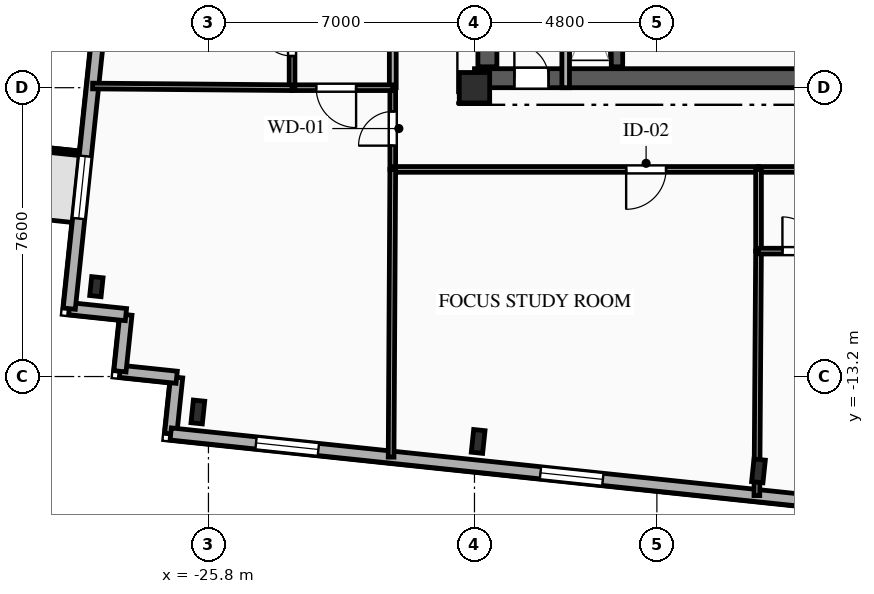
"""IFC4 building model, lengths in metres.
Left out: names, types, materials, properties, quantities, classifications, styles, units other than length and angle.
Written with IfcOpenShell. Run it as: python <this file> out.ifc"""

import sys

from ifc_helpers import new_model, si_unit, direction, frame, frame_2d, origin, origin_2d, place, context, subcontext, project, spatial, rectangle, i_section, extrude, element, fill, save


model = new_model("IFC4")
c1 = context("Model", 3, precision=1e-05, world=origin(), true_north=direction((0.0, 1.0)))
c2 = subcontext(c1, "Body", "Model", "MODEL_VIEW")
j1 = project(units=[si_unit("LENGTHUNIT", "METRE"), si_unit("PLANEANGLEUNIT", "RADIAN")], contexts=[c1])
p1 = place(None, origin())
s1 = spatial("IfcSite", under=j1, at=p1, CompositionType="ELEMENT")
p2 = place(p1, origin())
s2 = spatial("IfcBuilding", under=s1, at=p2, CompositionType="ELEMENT")
p3 = place(p2, frame((0.0, 0.0, 189.7)))
s3 = spatial("IfcBuildingStorey", under=s2, at=p3, CompositionType="ELEMENT", Elevation=189.7)
p4 = place(p3, frame((-18.8, -5.6, 0.0), z_axis=(0.0, 0.0, 1.0), x_axis=(1.0, 0.0, 0.0)))
e1 = element("IfcColumn", 1, at=p4, inside=s3, PredefinedType="COLUMN", context=c2, shape_type="SweptSolid", body=[
    extrude(rectangle(XDim=0.8, YDim=0.8, at=origin_2d()), origin(), (0.0, 0.0, 1.0), 3.35),
])
for number, where, z_axis, x_axis in (
    (2, (-26.079, -14.133, 0.0), (0.0, 0.0, 1.0), (0.995, -0.105, 0.0)),
    (3, (-18.703, -14.908, 0.0), (0.0, 0.0, 1.0), (0.995, -0.105, 0.0)),
    (4, (-11.327, -15.683, 0.0), (0.0, 0.0, 1.0), (0.995, -0.105, 0.0)),
):
    element("IfcColumn", number, at=place(p3, frame(where, z_axis=z_axis, x_axis=x_axis)), inside=s3, PredefinedType="COLUMN", context=c2, shape_type="SweptSolid", body=[
        extrude(i_section(OverallWidth=0.3, OverallDepth=0.6, WebThickness=0.015, FlangeThickness=0.03, FilletRadius=0.027, at=origin_2d()), origin(), (0.0, 0.0, 1.0), 3.35),
    ])
p5 = place(p3, frame((-28.749, -10.835, 0.0), z_axis=(0.0, 0.0, 1.0), x_axis=(0.994521895368, -0.104528463268, 0.0)))
e5 = element("IfcColumn", 5, at=p5, inside=s3, PredefinedType="COLUMN", context=c2, shape_type="SweptSolid", body=[
    extrude(i_section(OverallWidth=0.3, OverallDepth=0.5, WebThickness=0.014, FlangeThickness=0.028, FilletRadius=0.027, at=origin_2d()), origin(), (0.0, 0.0, 1.0), 3.35),
])
for number, where, z_axis, x_axis in (
    (6, (-26.793, -14.711, 0.0), (0.0, 0.0, 1.0), (0.104, 0.995, 0.0)),
    (7, (-26.637, -13.219, 0.0), (0.0, 0.0, 1.0), (-0.995, 0.104, 0.0)),
):
    element("IfcWall", number, at=place(p3, frame(where, z_axis=z_axis, x_axis=x_axis)), inside=s3, PredefinedType="SOLIDWALL", context=c2, shape_type="SweptSolid", body=[
        extrude(rectangle(XDim=1.5, YDim=0.32, at=frame_2d((0.75, 0.0))), origin(), (0.0, 0.0, 1.0), 3.04),
    ])
p6 = place(p3, frame((-28.128, -13.062, 0.0), z_axis=(0.0, 0.0, 1.0), x_axis=(0.104481464157, 0.994526834051, 0.0)))
e8 = element("IfcWall", 8, at=p6, inside=s3, PredefinedType="SOLIDWALL", context=c2, shape_type="SweptSolid", body=[
    extrude(rectangle(XDim=1.5, YDim=0.32, at=frame_2d((0.75, 0.0))), origin(), (0.0, 0.0, 1.0), 3.04),
])
p7 = place(p3, frame((-27.972, -11.571, 0.0), z_axis=(0.0, 0.0, 1.0), x_axis=(-0.994525057048, 0.104498377516, 0.0)))
e9 = element("IfcWall", 9, at=p7, inside=s3, PredefinedType="SOLIDWALL", context=c2, shape_type="SweptSolid", body=[
    extrude(rectangle(XDim=1.5, YDim=0.32, at=frame_2d((0.75, 0.0))), origin(), (0.0, 0.0, 1.0), 3.04),
])
p8 = place(p3, frame((-29.463, -11.414, 0.0), z_axis=(0.0, 0.0, 1.0), x_axis=(0.104530779244, 0.994521651947, 0.0)))
e10 = element("IfcWall", 10, at=p8, inside=s3, PredefinedType="SOLIDWALL", context=c2, shape_type="SweptSolid", body=[
    extrude(rectangle(XDim=28.8, YDim=0.32, at=frame_2d((14.4, 0.0))), origin(), (0.0, 0.0, 1.0), 3.04),
])
p9 = place(p8, frame((2.384, 0.0, 0.85)))
e11 = element("IfcOpeningElement", 11, at=p9, cuts=e10, PredefinedType="OPENING", context=c2, shape_type="SweptSolid", body=[
    extrude(rectangle(XDim=1.65, YDim=1.85, at=frame_2d((0.825, 0.925))), frame((0.0, 0.17, 0.0), z_axis=(0.0, -1.0, 0.0), x_axis=(1.0, 0.0, 0.0)), (0.0, 0.0, 1.0), 0.34),
])
p10 = place(p8, frame((8.973, 0.0, 0.85)))
e12 = element("IfcOpeningElement", 12, at=p10, cuts=e10, PredefinedType="OPENING", context=c2, shape_type="SweptSolid", body=[
    extrude(rectangle(XDim=1.95, YDim=1.85, at=frame_2d((0.975, 0.925))), frame((0.0, 0.17, 0.0), z_axis=(0.0, -1.0, 0.0), x_axis=(1.0, 0.0, 0.0)), (0.0, 0.0, 1.0), 0.34),
])
p11 = place(p8, frame((12.236, 0.0, 0.85)))
e13 = element("IfcOpeningElement", 13, at=p11, cuts=e10, PredefinedType="OPENING", context=c2, shape_type="SweptSolid", body=[
    extrude(rectangle(XDim=1.6, YDim=1.85, at=frame_2d((0.8, 0.925))), frame((0.0, 0.17, 0.0), z_axis=(0.0, -1.0, 0.0), x_axis=(1.0, 0.0, 0.0)), (0.0, 0.0, 1.0), 0.34),
])
p12 = place(p8, frame((15.044, 0.0, 0.85)))
e14 = element("IfcOpeningElement", 14, at=p12, cuts=e10, PredefinedType="OPENING", context=c2, shape_type="SweptSolid", body=[
    extrude(rectangle(XDim=1.6, YDim=1.85, at=frame_2d((0.8, 0.925))), frame((0.0, 0.17, 0.0), z_axis=(0.0, -1.0, 0.0), x_axis=(1.0, 0.0, 0.0)), (0.0, 0.0, 1.0), 0.34),
])
p13 = place(p8, frame((17.892, 0.0, 0.85)))
e15 = element("IfcOpeningElement", 15, at=p13, cuts=e10, PredefinedType="OPENING", context=c2, shape_type="SweptSolid", body=[
    extrude(rectangle(XDim=1.6, YDim=1.85, at=frame_2d((0.8, 0.925))), frame((0.0, 0.17, 0.0), z_axis=(0.0, -1.0, 0.0), x_axis=(1.0, 0.0, 0.0)), (0.0, 0.0, 1.0), 0.34),
])
p14 = place(p8, frame((23.442, 0.0, 0.85)))
e16 = element("IfcOpeningElement", 16, at=p14, cuts=e10, PredefinedType="OPENING", context=c2, shape_type="SweptSolid", body=[
    extrude(rectangle(XDim=1.65, YDim=1.85, at=frame_2d((0.825, 0.925))), frame((0.0, 0.17, 0.0), z_axis=(0.0, -1.0, 0.0), x_axis=(1.0, 0.0, 0.0)), (0.0, 0.0, 1.0), 0.34),
])
p15 = place(p3, frame((18.756, -19.498, 0.0), z_axis=(0.0, 0.0, 1.0), x_axis=(-0.994522060044, 0.104526896475, 0.0)))
e17 = element("IfcWall", 17, at=p15, inside=s3, PredefinedType="SOLIDWALL", context=c2, shape_type="SweptSolid", body=[
    extrude(rectangle(XDim=45.8, YDim=0.32, at=frame_2d((22.9, 0.0))), origin(), (0.0, 0.0, 1.0), 3.04),
])
p16 = place(p15, frame((1.217, 0.0, 0.85)))
e18 = element("IfcOpeningElement", 18, at=p16, cuts=e17, PredefinedType="OPENING", context=c2, shape_type="SweptSolid", body=[
    extrude(rectangle(XDim=1.65, YDim=1.85, at=frame_2d((0.825, 0.925))), frame((0.0, 0.17, 0.0), z_axis=(0.0, -1.0, 0.0), x_axis=(1.0, 0.0, 0.0)), (0.0, 0.0, 1.0), 0.34),
])
p17 = place(p15, frame((5.621, 0.0, 0.85)))
e19 = element("IfcOpeningElement", 19, at=p17, cuts=e17, PredefinedType="OPENING", context=c2, shape_type="SweptSolid", body=[
    extrude(rectangle(XDim=1.65, YDim=1.85, at=frame_2d((0.825, 0.925))), frame((0.0, 0.17, 0.0), z_axis=(0.0, -1.0, 0.0), x_axis=(1.0, 0.0, 0.0)), (0.0, 0.0, 1.0), 0.34),
])
p18 = place(p15, frame((13.433, 0.0, 0.85)))
e20 = element("IfcOpeningElement", 20, at=p18, cuts=e17, PredefinedType="OPENING", context=c2, shape_type="SweptSolid", body=[
    extrude(rectangle(XDim=2.2, YDim=1.85, at=frame_2d((1.1, 0.925))), frame((0.0, 0.17, 0.0), z_axis=(0.0, -1.0, 0.0), x_axis=(1.0, 0.0, 0.0)), (0.0, 0.0, 1.0), 0.34),
])
p19 = place(p15, frame((23.962, 0.0, 0.85)))
e21 = element("IfcOpeningElement", 21, at=p19, cuts=e17, PredefinedType="OPENING", context=c2, shape_type="SweptSolid", body=[
    extrude(rectangle(XDim=2.2, YDim=1.85, at=frame_2d((1.1, 0.925))), frame((0.0, 0.17, 0.0), z_axis=(0.0, -1.0, 0.0), x_axis=(1.0, 0.0, 0.0)), (0.0, 0.0, 1.0), 0.34),
])
p20 = place(p15, frame((34.366, 0.0, 0.85)))
e22 = element("IfcOpeningElement", 22, at=p20, cuts=e17, PredefinedType="OPENING", context=c2, shape_type="SweptSolid", body=[
    extrude(rectangle(XDim=1.65, YDim=1.85, at=frame_2d((0.825, 0.925))), frame((0.0, 0.17, 0.0), z_axis=(0.0, -1.0, 0.0), x_axis=(1.0, 0.0, 0.0)), (0.0, 0.0, 1.0), 0.34),
])
p21 = place(p15, frame((41.892, 0.0, 0.85)))
e23 = element("IfcOpeningElement", 23, at=p21, cuts=e17, PredefinedType="OPENING", context=c2, shape_type="SweptSolid", body=[
    extrude(rectangle(XDim=1.65, YDim=1.85, at=frame_2d((0.825, 0.925))), frame((0.0, 0.17, 0.0), z_axis=(0.0, -1.0, 0.0), x_axis=(1.0, 0.0, 0.0)), (0.0, 0.0, 1.0), 0.34),
])
p22 = place(p3, frame((-18.8, -5.35, 0.0), z_axis=(0.0, 0.0, 1.0), x_axis=(1.0, 0.0, 0.0)))
e24 = element("IfcWall", 24, at=p22, inside=s3, PredefinedType="SHEAR", context=c2, shape_type="SweptSolid", body=[
    extrude(rectangle(XDim=9.6, YDim=0.5, at=frame_2d((4.8, 0.0))), origin(), (0.0, 0.0, 1.0), 3.04),
])
p23 = place(p22, frame((1.05, 0.0, 0.0)))
e25 = element("IfcOpeningElement", 25, at=p23, cuts=e24, PredefinedType="OPENING", context=c2, shape_type="SweptSolid", body=[
    extrude(rectangle(XDim=0.9, YDim=2.1, at=frame_2d((0.45, 1.05))), frame((0.0, 0.26, 0.0), z_axis=(0.0, -1.0, 0.0), x_axis=(1.0, 0.0, 0.0)), (0.0, 0.0, 1.0), 0.52),
])
p24 = place(p3, frame((-18.46, -5.05, 0.0), z_axis=(0.0, 0.0, 1.0), x_axis=(0.0, 1.0, 0.0)))
e26 = element("IfcWall", 26, at=p24, inside=s3, PredefinedType="SHEAR", context=c2, shape_type="SweptSolid", body=[
    extrude(rectangle(XDim=10.1, YDim=0.5, at=frame_2d((5.05, 0.0))), origin(), (0.0, 0.0, 1.0), 3.04),
])
p25 = place(p3, frame((-15.05, -5.05, 0.0), z_axis=(0.0, 0.0, 1.0), x_axis=(0.0, 1.0, 0.0)))
e27 = element("IfcWall", 27, at=p25, inside=s3, PredefinedType="SHEAR", context=c2, shape_type="SweptSolid", body=[
    extrude(rectangle(XDim=10.1, YDim=0.3, at=frame_2d((5.05, 0.0))), origin(), (0.0, 0.0, 1.0), 3.04),
])
p26 = place(p3, frame((-16.4, -5.6, 0.0), z_axis=(0.0, 0.0, 1.0), x_axis=(0.0, 1.0, 0.0)))
e28 = element("IfcWall", 28, at=p26, inside=s3, PredefinedType="PARTITIONING", context=c2, shape_type="SweptSolid", body=[
    extrude(rectangle(XDim=3.49, YDim=0.2, at=frame_2d((1.745, 0.0))), origin(), (0.0, 0.0, 1.0), 3.04),
])
p27 = place(p3, frame((-20.95, -7.75, 0.0), z_axis=(0.0, 0.0, 1.0), x_axis=(0.0, 1.0, 0.0)))
e29 = element("IfcWall", 29, at=p27, inside=s3, PredefinedType="PARTITIONING", context=c2, shape_type="SweptSolid", body=[
    extrude(rectangle(XDim=2.15, YDim=0.15, at=frame_2d((1.075, 0.0))), origin(), (0.0, 0.0, 1.0), 3.04),
])
p28 = place(p27, frame((0.625, 0.0, 0.0)))
e30 = element("IfcOpeningElement", 30, at=p28, cuts=e29, PredefinedType="OPENING", context=c2, shape_type="SweptSolid", body=[
    extrude(rectangle(XDim=0.9, YDim=2.1, at=frame_2d((0.45, 1.05))), frame((0.0, 0.085, 0.0), z_axis=(0.0, -1.0, 0.0), x_axis=(1.0, 0.0, 0.0)), (0.0, 0.0, 1.0), 0.17),
])
p29 = place(p3, frame((-11.325, -7.75, 0.0), z_axis=(0.0, 0.0, 1.0), x_axis=(-1.0, 0.0, 0.0)))
e31 = element("IfcWall", 31, at=p29, inside=s3, PredefinedType="PARTITIONING", context=c2, shape_type="SweptSolid", body=[
    extrude(rectangle(XDim=9.625, YDim=0.15, at=frame_2d((4.812, 0.0))), origin(), (0.0, 0.0, 1.0), 3.04),
])
p30 = place(p29, frame((2.434, 0.0, 0.0)))
e32 = element("IfcOpeningElement", 32, at=p30, cuts=e31, PredefinedType="OPENING", context=c2, shape_type="SweptSolid", body=[
    extrude(rectangle(XDim=1.05, YDim=2.15, at=frame_2d((0.525, 1.075))), frame((0.0, 0.085, 0.0), z_axis=(0.0, -1.0, 0.0), x_axis=(1.0, 0.0, 0.0)), (0.0, 0.0, 1.0), 0.17),
])
p31 = place(p3, frame((-8.875, -7.75, 0.0), z_axis=(0.0, 0.0, 1.0), x_axis=(-1.0, 0.0, 0.0)))
e33 = element("IfcWall", 33, at=p31, inside=s3, PredefinedType="PLUMBINGWALL", context=c2, shape_type="SweptSolid", body=[
    extrude(rectangle(XDim=2.45, YDim=0.15, at=frame_2d((1.225, 0.0))), origin(), (0.0, 0.0, 1.0), 3.04),
])
p32 = place(p3, frame((-20.95, -5.6, 0.0), z_axis=(0.0, 0.0, 1.0), x_axis=(0.0, 1.0, 0.0)))
e34 = element("IfcWall", 34, at=p32, inside=s3, PredefinedType="PARTITIONING", context=c2, shape_type="SweptSolid", body=[
    extrude(rectangle(XDim=14.1, YDim=0.18, at=frame_2d((7.05, 0.0))), origin(), (0.0, 0.0, 1.0), 3.04),
])
p33 = place(p32, frame((5.058, 0.0, 0.0)))
e35 = element("IfcOpeningElement", 35, at=p33, cuts=e34, PredefinedType="OPENING", context=c2, shape_type="SweptSolid", body=[
    extrude(rectangle(XDim=1.0, YDim=2.15, at=frame_2d((0.5, 1.075))), frame((0.0, 0.1, 0.0), z_axis=(0.0, -1.0, 0.0), x_axis=(1.0, 0.0, 0.0)), (0.0, 0.0, 1.0), 0.2),
])
p34 = place(p3, frame((-20.95, -5.6, 0.0), z_axis=(0.0, 0.0, 1.0), x_axis=(-1.0, 0.0, 0.0)))
e36 = element("IfcWall", 36, at=p34, inside=s3, PredefinedType="PARTITIONING", context=c2, shape_type="SweptSolid", body=[
    extrude(rectangle(XDim=2.65, YDim=0.15, at=frame_2d((1.325, 0.0))), origin(), (0.0, 0.0, 1.0), 3.04),
])
p35 = place(p34, frame((0.965, 0.0, 0.0)))
e37 = element("IfcOpeningElement", 37, at=p35, cuts=e36, PredefinedType="OPENING", context=c2, shape_type="SweptSolid", body=[
    extrude(rectangle(XDim=1.05, YDim=2.15, at=frame_2d((0.525, 1.075))), frame((0.0, 0.085, 0.0), z_axis=(0.0, -1.0, 0.0), x_axis=(1.0, 0.0, 0.0)), (0.0, 0.0, 1.0), 0.17),
])
p36 = place(p3, frame((-23.6, -5.6, 0.0), z_axis=(0.0, 0.0, 1.0), x_axis=(0.0, 1.0, 0.0)))
e38 = element("IfcWall", 38, at=p36, inside=s3, PredefinedType="PLUMBINGWALL", context=c2, shape_type="SweptSolid", body=[
    extrude(rectangle(XDim=2.35, YDim=0.15, at=frame_2d((1.175, 0.0))), origin(), (0.0, 0.0, 1.0), 2.695),
])
p37 = place(p36, frame((0.834, 0.0, 0.0)))
e39 = element("IfcOpeningElement", 39, at=p37, cuts=e38, PredefinedType="OPENING", context=c2, shape_type="SweptSolid", body=[
    extrude(rectangle(XDim=0.9, YDim=2.1, at=frame_2d((0.45, 1.05))), frame((0.0, 0.085, 0.0), z_axis=(0.0, -1.0, 0.0), x_axis=(1.0, 0.0, 0.0)), (0.0, 0.0, 1.0), 0.17),
])
p38 = place(p3, frame((-28.848, -5.556, 0.0), z_axis=(0.0, 0.0, 1.0), x_axis=(0.999964936305, -0.008374136435, 0.0)))
e40 = element("IfcWall", 40, at=p38, inside=s3, PredefinedType="PLUMBINGWALL", context=c2, shape_type="SweptSolid", body=[
    extrude(rectangle(XDim=5.248, YDim=0.15, at=frame_2d((2.624, 0.0))), origin(), (0.0, 0.0, 1.0), 3.04),
])
p39 = place(p3, frame((-20.95, -7.75, 0.0), z_axis=(0.0, 0.0, 1.0), x_axis=(-0.005804668564, -0.99998315277, 0.0)))
e41 = element("IfcWall", 41, at=p39, inside=s3, PredefinedType="PARTITIONING", context=c2, shape_type="SweptSolid", body=[
    extrude(rectangle(XDim=7.571, YDim=0.15, at=frame_2d((3.785, 0.0))), origin(), (0.0, 0.0, 1.0), 3.04),
])
p40 = place(p3, frame((-11.325, -9.9, 0.0), z_axis=(0.0, 0.0, 1.0), x_axis=(-0.006831737937, -0.999976663406, 0.0)))
e42 = element("IfcWall", 42, at=p40, inside=s3, PredefinedType="PARTITIONING", context=c2, shape_type="SweptSolid", body=[
    extrude(rectangle(XDim=6.433, YDim=0.15, at=frame_2d((3.216, 0.0))), origin(), (0.0, 0.0, 1.0), 2.665),
])
p41 = place(p3, frame((-11.325, -7.75, 0.0), z_axis=(0.0, 0.0, 1.0), x_axis=(0.0, -1.0, 0.0)))
e43 = element("IfcWall", 43, at=p41, inside=s3, PredefinedType="PLUMBINGWALL", context=c2, shape_type="SweptSolid", body=[
    extrude(rectangle(XDim=2.15, YDim=0.15, at=frame_2d((1.075, 0.0))), origin(), (0.0, 0.0, 1.0), 3.04),
])
p42 = place(p3, frame((-11.325, -9.9, 0.0), z_axis=(0.0, 0.0, 1.0), x_axis=(1.0, 0.0, 0.0)))
e44 = element("IfcWall", 44, at=p42, inside=s3, PredefinedType="PLUMBINGWALL", context=c2, shape_type="SweptSolid", body=[
    extrude(rectangle(XDim=2.45, YDim=0.15, at=frame_2d((1.225, 0.0))), origin(), (0.0, 0.0, 1.0), 3.04),
])
p43 = place(p42, frame((0.629, 0.0, 0.0)))
e45 = element("IfcOpeningElement", 45, at=p43, cuts=e44, PredefinedType="OPENING", context=c2, shape_type="SweptSolid", body=[
    extrude(rectangle(XDim=0.9, YDim=2.1, at=frame_2d((0.45, 1.05))), frame((0.0, 0.085, 0.0), z_axis=(0.0, -1.0, 0.0), x_axis=(1.0, 0.0, 0.0)), (0.0, 0.0, 1.0), 0.17),
])
p44 = place(p9, origin())
e46 = element("IfcWindow", 46, at=p44, inside=s3, PartitioningType="SINGLE_PANEL", PredefinedType="WINDOW", context=c2, shape_type="SweptSolid", body=[
    extrude(rectangle(XDim=1.65, YDim=1.85, at=frame_2d((0.825, 0.925))), frame((0.0, 0.03, 0.0), z_axis=(0.0, -1.0, 0.0), x_axis=(1.0, 0.0, 0.0)), (0.0, 0.0, 1.0), 0.06),
])
fill(e11, e46)
p45 = place(p20, origin())
e47 = element("IfcWindow", 47, at=p45, inside=s3, PartitioningType="SINGLE_PANEL", PredefinedType="WINDOW", context=c2, shape_type="SweptSolid", body=[
    extrude(rectangle(XDim=1.65, YDim=1.85, at=frame_2d((0.825, 0.925))), frame((0.0, 0.03, 0.0), z_axis=(0.0, -1.0, 0.0), x_axis=(1.0, 0.0, 0.0)), (0.0, 0.0, 1.0), 0.06),
])
fill(e22, e47)
p46 = place(p21, origin())
e48 = element("IfcWindow", 48, at=p46, inside=s3, PartitioningType="SINGLE_PANEL", PredefinedType="WINDOW", context=c2, shape_type="SweptSolid", body=[
    extrude(rectangle(XDim=1.65, YDim=1.85, at=frame_2d((0.825, 0.925))), frame((0.0, 0.03, 0.0), z_axis=(0.0, -1.0, 0.0), x_axis=(1.0, 0.0, 0.0)), (0.0, 0.0, 1.0), 0.06),
])
fill(e23, e48)
p47 = place(p23, origin())
e49 = element("IfcDoor", 49, at=p47, inside=s3, OperationType="SINGLE_SWING_LEFT", PredefinedType="DOOR", context=c2, shape_type="SweptSolid", body=[
    extrude(rectangle(XDim=0.9, YDim=2.1, at=frame_2d((0.45, 1.05))), frame((0.0, 0.025, 0.0), z_axis=(0.0, -1.0, 0.0), x_axis=(1.0, 0.0, 0.0)), (0.0, 0.0, 1.0), 0.05),
])
fill(e25, e49)
p48 = place(p28, origin())
e50 = element("IfcDoor", 50, at=p48, inside=s3, OperationType="SINGLE_SWING_LEFT", PredefinedType="DOOR", context=c2, shape_type="SweptSolid", body=[
    extrude(rectangle(XDim=0.9, YDim=2.1, at=frame_2d((0.45, 1.05))), frame((0.0, 0.025, 0.0), z_axis=(0.0, -1.0, 0.0), x_axis=(1.0, 0.0, 0.0)), (0.0, 0.0, 1.0), 0.05),
])
fill(e30, e50)
p49 = place(p30, origin())
e51 = element("IfcDoor", 51, at=p49, inside=s3, OperationType="SINGLE_SWING_RIGHT", PredefinedType="DOOR", context=c2, shape_type="SweptSolid", body=[
    extrude(rectangle(XDim=1.05, YDim=2.15, at=frame_2d((0.525, 1.075))), frame((0.0, 0.025, 0.0), z_axis=(0.0, -1.0, 0.0), x_axis=(1.0, 0.0, 0.0)), (0.0, 0.0, 1.0), 0.05),
])
fill(e32, e51)
p50 = place(p35, origin())
e52 = element("IfcDoor", 52, at=p50, inside=s3, OperationType="SINGLE_SWING_LEFT", PredefinedType="DOOR", context=c2, shape_type="SweptSolid", body=[
    extrude(rectangle(XDim=1.05, YDim=2.15, at=frame_2d((0.525, 1.075))), frame((0.0, 0.025, 0.0), z_axis=(0.0, -1.0, 0.0), x_axis=(1.0, 0.0, 0.0)), (0.0, 0.0, 1.0), 0.05),
])
fill(e37, e52)
p51 = place(p37, origin())
e53 = element("IfcDoor", 53, at=p51, inside=s3, OperationType="SINGLE_SWING_RIGHT", PredefinedType="DOOR", context=c2, shape_type="SweptSolid", body=[
    extrude(rectangle(XDim=0.9, YDim=2.1, at=frame_2d((0.45, 1.05))), frame((0.0, 0.025, 0.0), z_axis=(0.0, -1.0, 0.0), x_axis=(1.0, 0.0, 0.0)), (0.0, 0.0, 1.0), 0.05),
])
fill(e39, e53)
p52 = place(p43, origin())
e54 = element("IfcDoor", 54, at=p52, inside=s3, OperationType="SINGLE_SWING_LEFT", PredefinedType="DOOR", context=c2, shape_type="SweptSolid", body=[
    extrude(rectangle(XDim=0.9, YDim=2.1, at=frame_2d((0.45, 1.05))), frame((0.0, 0.025, 0.0), z_axis=(0.0, -1.0, 0.0), x_axis=(1.0, 0.0, 0.0)), (0.0, 0.0, 1.0), 0.05),
])
fill(e45, e54)
save(model, sys.argv[1])
